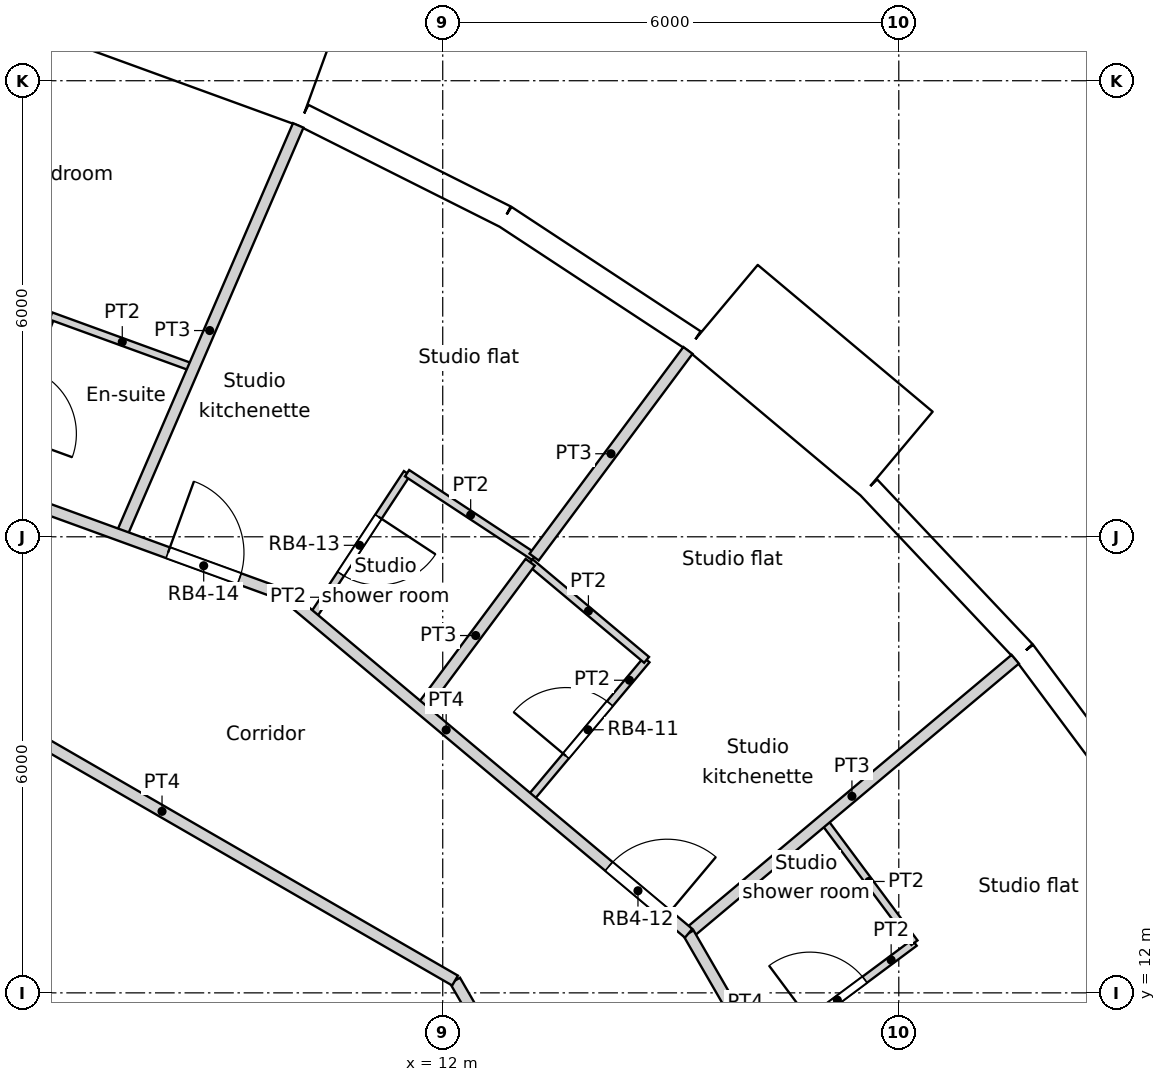
"""IFC4 building model, lengths in metres.
Left out: names, types, materials, properties, quantities, classifications, styles, units other than length and angle.
Written with IfcOpenShell. Run it as: python <this file> out.ifc"""

import sys

from ifc_helpers import new_model, si_unit, direction, frame, frame_2d, origin, origin_2d, place, context, subcontext, project, spatial, rectangle, circle, extrude, element, fill, save


model = new_model("IFC4")
c1 = context("Model", 3, precision=1e-05, world=origin(), true_north=direction((0.0, 1.0)))
c2 = subcontext(c1, "Body", "Model", "MODEL_VIEW")
j1 = project(units=[si_unit("LENGTHUNIT", "METRE"), si_unit("PLANEANGLEUNIT", "RADIAN")], contexts=[c1])
p1 = place(None, origin())
s1 = spatial("IfcSite", under=j1, at=p1, CompositionType="ELEMENT")
p2 = place(p1, origin())
s2 = spatial("IfcBuilding", under=s1, at=p2, CompositionType="ELEMENT")
p3 = place(p2, frame((0.0, 0.0, 158.4)))
s3 = spatial("IfcBuildingStorey", under=s2, at=p3, CompositionType="ELEMENT", Elevation=158.4)
for number, where, z_axis, x_axis in (
    (1, (18.805, 15.779, 0.0), (0.0, 0.0, 1.0), (1.0, 0.0, 0.0)),
    (2, (14.659, 19.69, 0.0), (0.0, 0.0, 1.0), (1.0, 0.0, 0.0)),
    (3, (9.723, 22.54, 0.0), (0.0, 0.0, 1.0), (1.0, 0.0, 0.0)),
):
    element("IfcColumn", number, at=place(p3, frame(where, z_axis=z_axis, x_axis=x_axis)), inside=s3, PredefinedType="COLUMN", context=c2, shape_type="SweptSolid", body=[
        extrude(circle(Radius=0.6, at=origin_2d()), origin(), (0.0, 0.0, 1.0), 3.6),
    ])
for number, where, z_axis, x_axis in (
    (4, (11.735, 14.716, 0.0), (0.0, 0.0, 1.0), (1.0, 0.0, 0.0)),
    (5, (6.876, 17.521, 0.0), (0.0, 0.0, 1.0), (1.0, 0.0, 0.0)),
):
    element("IfcColumn", number, at=place(p3, frame(where, z_axis=z_axis, x_axis=x_axis)), inside=s3, PredefinedType="COLUMN", context=c2, shape_type="SweptSolid", body=[
        extrude(circle(Radius=0.65, at=origin_2d()), origin(), (0.0, 0.0, 1.0), 3.6),
    ])
p4 = place(p3, frame((21.422, 14.101, 0.0), z_axis=(0.0, 0.0, 1.0), x_axis=(-0.597197580538, 0.80209416517, 0.0)))
e6 = element("IfcWall", 6, at=p4, inside=s3, PredefinedType="SOLIDWALL", context=c2, shape_type="SweptSolid", body=[
    extrude(rectangle(XDim=2.973, YDim=0.3, at=frame_2d((1.486, 0.0))), origin(), (0.0, 0.0, 1.0), 3.3),
])
p5 = place(p4, frame((1.486, 0.0, 1.55)))
e7 = element("IfcOpeningElement", 7, at=p5, cuts=e6, PredefinedType="OPENING", context=c2, shape_type="SweptSolid", body=[
    extrude(circle(Radius=0.9, at=origin_2d()), frame((0.0, 0.16, 0.0), z_axis=(0.0, -1.0, 0.0), x_axis=(1.0, 0.0, 0.0)), (0.0, 0.0, 1.0), 0.32),
])
p6 = place(p3, frame((19.647, 16.486, 0.0), z_axis=(0.0, 0.0, 1.0), x_axis=(-0.686235184166, 0.727379730273, 0.0)))
e8 = element("IfcWall", 8, at=p6, inside=s3, PredefinedType="SOLIDWALL", context=c2, shape_type="SweptSolid", body=[
    extrude(rectangle(XDim=2.973, YDim=0.3, at=frame_2d((1.486, 0.0))), origin(), (0.0, 0.0, 1.0), 3.3),
])
p7 = place(p6, frame((1.486, 0.0, 1.55)))
e9 = element("IfcOpeningElement", 9, at=p7, cuts=e8, PredefinedType="OPENING", context=c2, shape_type="SweptSolid", body=[
    extrude(circle(Radius=0.9, at=origin_2d()), frame((0.0, 0.16, 0.0), z_axis=(0.0, -1.0, 0.0), x_axis=(1.0, 0.0, 0.0)), (0.0, 0.0, 1.0), 0.32),
])
p8 = place(p3, frame((17.977, 19.09, -0.3), z_axis=(0.0, 0.0, 1.0), x_axis=(-0.766022196139, 0.642814121673, 0.0)))
e10 = element("IfcWall", 10, at=p8, inside=s3, PredefinedType="ELEMENTEDWALL", context=c2, shape_type="SweptSolid", body=[
    extrude(rectangle(XDim=3.0, YDim=1.45, at=frame_2d((1.5, 0.0))), origin(), (0.0, 0.0, 1.0), 3.6),
])
p9 = place(p8, frame((1.5, 0.0, 1.85)))
e11 = element("IfcOpeningElement", 11, at=p9, cuts=e10, PredefinedType="OPENING", context=c2, shape_type="SweptSolid", body=[
    extrude(circle(Radius=0.9, at=origin_2d()), frame((0.0, 0.735, 0.0), z_axis=(0.0, -1.0, 0.0), x_axis=(1.0, 0.0, 0.0)), (0.0, 0.0, 1.0), 1.47),
])
p10 = place(p3, frame((15.308, 20.578, 0.0), z_axis=(0.0, 0.0, 1.0), x_axis=(-0.835470659512, 0.549535055382, 0.0)))
e12 = element("IfcWall", 12, at=p10, inside=s3, PredefinedType="SOLIDWALL", context=c2, shape_type="SweptSolid", body=[
    extrude(rectangle(XDim=2.973, YDim=0.3, at=frame_2d((1.487, 0.0))), origin(), (0.0, 0.0, 1.0), 3.3),
])
p11 = place(p10, frame((1.486, 0.0, 1.55)))
e13 = element("IfcOpeningElement", 13, at=p11, cuts=e12, PredefinedType="OPENING", context=c2, shape_type="SweptSolid", body=[
    extrude(circle(Radius=0.9, at=origin_2d()), frame((0.0, 0.16, 0.0), z_axis=(0.0, -1.0, 0.0), x_axis=(1.0, 0.0, 0.0)), (0.0, 0.0, 1.0), 0.32),
])
p12 = place(p3, frame((12.824, 22.211, 0.0), z_axis=(0.0, 0.0, 1.0), x_axis=(-0.893637442555, 0.448789618045, 0.0)))
e14 = element("IfcWall", 14, at=p12, inside=s3, PredefinedType="SOLIDWALL", context=c2, shape_type="SweptSolid", body=[
    extrude(rectangle(XDim=2.973, YDim=0.3, at=frame_2d((1.486, 0.0))), origin(), (0.0, 0.0, 1.0), 3.3),
])
p13 = place(p12, frame((1.486, 0.0, 1.55)))
e15 = element("IfcOpeningElement", 15, at=p13, cuts=e14, PredefinedType="OPENING", context=c2, shape_type="SweptSolid", body=[
    extrude(circle(Radius=0.9, at=origin_2d()), frame((0.0, 0.16, 0.0), z_axis=(0.0, -1.0, 0.0), x_axis=(1.0, 0.0, 0.0)), (0.0, 0.0, 1.0), 0.32),
])
p14 = place(p3, frame((10.363, 24.087, -0.3), z_axis=(0.0, 0.0, 1.0), x_axis=(-0.939686455819, 0.342037080957, 0.0)))
e16 = element("IfcWall", 16, at=p14, inside=s3, PredefinedType="ELEMENTEDWALL", context=c2, shape_type="SweptSolid", body=[
    extrude(rectangle(XDim=3.0, YDim=1.45, at=frame_2d((1.5, 0.0))), origin(), (0.0, 0.0, 1.0), 3.6),
])
p15 = place(p14, frame((1.5, 0.0, 1.85)))
e17 = element("IfcOpeningElement", 17, at=p15, cuts=e16, PredefinedType="OPENING", context=c2, shape_type="SweptSolid", body=[
    extrude(circle(Radius=0.9, at=origin_2d()), frame((0.0, 0.735, 0.0), z_axis=(0.0, -1.0, 0.0), x_axis=(1.0, 0.0, 0.0)), (0.0, 0.0, 1.0), 1.47),
])
p16 = place(p3, frame((12.162, 12.162, 0.0), z_axis=(0.0, 0.0, 1.0), x_axis=(0.499961633463, -0.866047553582, 0.0)))
e18 = element("IfcWall", 18, at=p16, inside=s3, PredefinedType="PARTITIONING", context=c2, shape_type="SweptSolid", body=[
    extrude(rectangle(XDim=2.15, YDim=0.15, at=frame_2d((1.075, 0.0))), origin(), (0.0, 0.0, 1.0), 3.3),
])
p17 = place(p3, frame((15.235, 12.784, 0.0), z_axis=(0.0, 0.0, 1.0), x_axis=(0.499940714931, -0.86605962933, 0.0)))
e19 = element("IfcWall", 19, at=p17, inside=s3, PredefinedType="PARTITIONING", context=c2, shape_type="SweptSolid", body=[
    extrude(rectangle(XDim=6.907, YDim=0.15, at=frame_2d((3.454, 0.0))), origin(), (0.0, 0.0, 1.0), 3.3),
])
p18 = place(p17, frame((5.249, 0.0, 0.0)))
e20 = element("IfcOpeningElement", 20, at=p18, cuts=e19, PredefinedType="OPENING", context=c2, shape_type="SweptSolid", body=[
    extrude(rectangle(XDim=1.0, YDim=2.1, at=frame_2d((0.5, 1.05))), frame((0.0, 0.075, 0.0), z_axis=(0.0, -1.0, 0.0), x_axis=(1.0, 0.0, 0.0)), (0.0, 0.0, 1.0), 0.15),
])
p19 = place(p17, frame((3.041, 0.0, 0.0)))
e21 = element("IfcOpeningElement", 21, at=p19, cuts=e19, PredefinedType="OPENING", context=c2, shape_type="SweptSolid", body=[
    extrude(rectangle(XDim=1.0, YDim=2.1, at=frame_2d((0.5, 1.05))), frame((0.0, 0.075, 0.0), z_axis=(0.0, -1.0, 0.0), x_axis=(1.0, 0.0, 0.0)), (0.0, 0.0, 1.0), 0.15),
])
p20 = place(p3, frame((9.943, 17.222, 0.0), z_axis=(0.0, 0.0, 1.0), x_axis=(0.766192104565, -0.642611592567, 0.0)))
e22 = element("IfcWall", 22, at=p20, inside=s3, PredefinedType="PARTITIONING", context=c2, shape_type="SweptSolid", body=[
    extrude(rectangle(XDim=6.906, YDim=0.15, at=frame_2d((3.453, 0.0))), origin(), (0.0, 0.0, 1.0), 3.3),
])
p21 = place(p20, frame((5.537, 0.0, 0.0)))
e23 = element("IfcOpeningElement", 23, at=p21, cuts=e22, PredefinedType="OPENING", context=c2, shape_type="SweptSolid", body=[
    extrude(rectangle(XDim=1.0, YDim=2.1, at=frame_2d((0.5, 1.05))), frame((0.0, 0.075, 0.0), z_axis=(0.0, -1.0, 0.0), x_axis=(1.0, 0.0, 0.0)), (0.0, 0.0, 1.0), 0.15),
])
p22 = place(p3, frame((4.452, 16.614, 0.0), z_axis=(0.0, 0.0, 1.0), x_axis=(0.866005203721, -0.500034985904, 0.0)))
e24 = element("IfcWall", 24, at=p22, inside=s3, PredefinedType="PARTITIONING", context=c2, shape_type="SweptSolid", body=[
    extrude(rectangle(XDim=8.903, YDim=0.15, at=frame_2d((4.452, 0.0))), origin(), (0.0, 0.0, 1.0), 3.3),
])
p23 = place(p3, frame((3.452, 19.585, 0.0), z_axis=(0.0, 0.0, 1.0), x_axis=(0.939737689664, -0.341896292208, 0.0)))
e25 = element("IfcWall", 25, at=p23, inside=s3, PredefinedType="PARTITIONING", context=c2, shape_type="SweptSolid", body=[
    extrude(rectangle(XDim=6.908, YDim=0.15, at=frame_2d((3.454, 0.0))), origin(), (0.0, 0.0, 1.0), 3.3),
])
p24 = place(p23, frame((5.249, 0.0, 0.0)))
e26 = element("IfcOpeningElement", 26, at=p24, cuts=e25, PredefinedType="OPENING", context=c2, shape_type="SweptSolid", body=[
    extrude(rectangle(XDim=1.0, YDim=2.1, at=frame_2d((0.5, 1.05))), frame((0.0, 0.075, 0.0), z_axis=(0.0, -1.0, 0.0), x_axis=(1.0, 0.0, 0.0)), (0.0, 0.0, 1.0), 0.15),
])
p25 = place(p3, frame((16.178, 11.15, 0.0), z_axis=(0.0, 0.0, 1.0), x_axis=(0.8020923136, 0.597200067367, 0.0)))
e27 = element("IfcWall", 27, at=p25, inside=s3, PredefinedType="PARTITIONING", context=c2, shape_type="SweptSolid", body=[
    extrude(rectangle(XDim=2.529, YDim=0.1, at=frame_2d((1.264, 0.0))), origin(), (0.0, 0.0, 1.0), 3.3),
])
p26 = place(p25, frame((0.814, 0.0, 0.0)))
e28 = element("IfcOpeningElement", 28, at=p26, cuts=e27, PredefinedType="OPENING", context=c2, shape_type="SweptSolid", body=[
    extrude(rectangle(XDim=0.9, YDim=2.04, at=frame_2d((0.45, 1.02))), frame((0.0, 0.05, 0.0), z_axis=(0.0, -1.0, 0.0), x_axis=(1.0, 0.0, 0.0)), (0.0, 0.0, 1.0), 0.1),
])
p27 = place(p3, frame((17.007, 14.271, 0.0), z_axis=(0.0, 0.0, 1.0), x_axis=(0.597019866774, -0.802226450996, 0.0)))
e29 = element("IfcWall", 29, at=p27, inside=s3, PredefinedType="PARTITIONING", context=c2, shape_type="SweptSolid", body=[
    extrude(rectangle(XDim=2.008, YDim=0.1, at=frame_2d((1.004, 0.0))), origin(), (0.0, 0.0, 1.0), 3.3),
])
p28 = place(p3, frame((15.235, 12.784, 0.0), z_axis=(0.0, 0.0, 1.0), x_axis=(0.766069165353, 0.642758145725, 0.0)))
e30 = element("IfcWall", 30, at=p28, inside=s3, PredefinedType="PARTITIONING", context=c2, shape_type="SweptSolid", body=[
    extrude(rectangle(XDim=5.609, YDim=0.15, at=frame_2d((2.804, 0.0))), origin(), (0.0, 0.0, 1.0), 3.3),
])
p29 = place(p3, frame((13.139, 14.542, 0.0), z_axis=(0.0, 0.0, 1.0), x_axis=(0.642731657745, 0.766091388891, 0.0)))
e31 = element("IfcWall", 31, at=p29, inside=s3, PredefinedType="PARTITIONING", context=c2, shape_type="SweptSolid", body=[
    extrude(rectangle(XDim=2.401, YDim=0.1, at=frame_2d((1.2, 0.0))), origin(), (0.0, 0.0, 1.0), 3.3),
])
p30 = place(p29, frame((0.75, 0.0, 0.0)))
e32 = element("IfcOpeningElement", 32, at=p30, cuts=e31, PredefinedType="OPENING", context=c2, shape_type="SweptSolid", body=[
    extrude(rectangle(XDim=0.9, YDim=2.04, at=frame_2d((0.45, 1.02))), frame((0.0, 0.05, 0.0), z_axis=(0.0, -1.0, 0.0), x_axis=(1.0, 0.0, 0.0)), (0.0, 0.0, 1.0), 0.1),
])
p31 = place(p3, frame((13.151, 17.665, 0.0), z_axis=(0.0, 0.0, 1.0), x_axis=(0.766224532916, -0.642572925945, 0.0)))
e33 = element("IfcWall", 33, at=p31, inside=s3, PredefinedType="PARTITIONING", context=c2, shape_type="SweptSolid", body=[
    extrude(rectangle(XDim=1.998, YDim=0.1, at=frame_2d((0.999, 0.0))), origin(), (0.0, 0.0, 1.0), 3.3),
])
p32 = place(p3, frame((13.202, 17.733, 0.0), z_axis=(0.0, 0.0, 1.0), x_axis=(0.597149819296, 0.802129723495, 0.0)))
e34 = element("IfcWall", 34, at=p32, inside=s3, PredefinedType="PARTITIONING", context=c2, shape_type="SweptSolid", body=[
    extrude(rectangle(XDim=3.39, YDim=0.15, at=frame_2d((1.695, 0.0))), origin(), (0.0, 0.0, 1.0), 3.3),
])
p33 = place(p3, frame((11.716, 15.737, 0.0), z_axis=(0.0, 0.0, 1.0), x_axis=(0.597021412293, 0.802225300813, 0.0)))
e35 = element("IfcWall", 35, at=p33, inside=s3, PredefinedType="PARTITIONING", context=c2, shape_type="SweptSolid", body=[
    extrude(rectangle(XDim=2.403, YDim=0.15, at=frame_2d((1.202, 0.0))), origin(), (0.0, 0.0, 1.0), 3.3),
])
p34 = place(p3, frame((11.531, 18.837, 0.0), z_axis=(0.0, 0.0, 1.0), x_axis=(0.835392041163, -0.549654562032, 0.0)))
e36 = element("IfcWall", 36, at=p34, inside=s3, PredefinedType="PARTITIONING", context=c2, shape_type="SweptSolid", body=[
    extrude(rectangle(XDim=2.003, YDim=0.1, at=frame_2d((1.001, 0.0))), origin(), (0.0, 0.0, 1.0), 3.3),
])
p35 = place(p3, frame((10.282, 16.939, 0.0), z_axis=(0.0, 0.0, 1.0), x_axis=(0.549730960803, 0.83534176882, 0.0)))
e37 = element("IfcWall", 37, at=p35, inside=s3, PredefinedType="PARTITIONING", context=c2, shape_type="SweptSolid", body=[
    extrude(rectangle(XDim=2.272, YDim=0.1, at=frame_2d((1.136, 0.0))), origin(), (0.0, 0.0, 1.0), 3.3),
])
p36 = place(p35, frame((0.686, 0.0, 0.0)))
e38 = element("IfcOpeningElement", 38, at=p36, cuts=e37, PredefinedType="OPENING", context=c2, shape_type="SweptSolid", body=[
    extrude(rectangle(XDim=0.9, YDim=2.04, at=frame_2d((0.45, 1.02))), frame((0.0, 0.05, 0.0), z_axis=(0.0, -1.0, 0.0), x_axis=(1.0, 0.0, 0.0)), (0.0, 0.0, 1.0), 0.1),
])
p37 = place(p3, frame((7.77, 18.015, 0.0), z_axis=(0.0, 0.0, 1.0), x_axis=(0.396238716554, 0.918147526002, 0.0)))
e39 = element("IfcWall", 39, at=p37, inside=s3, PredefinedType="PARTITIONING", context=c2, shape_type="SweptSolid", body=[
    extrude(rectangle(XDim=5.879, YDim=0.15, at=frame_2d((2.939, 0.0))), origin(), (0.0, 0.0, 1.0), 3.3),
])
p38 = place(p3, frame((6.845, 20.905, 0.0), z_axis=(0.0, 0.0, 1.0), x_axis=(0.939757747305, -0.341841156651, 0.0)))
e40 = element("IfcWall", 40, at=p38, inside=s3, PredefinedType="PARTITIONING", context=c2, shape_type="SweptSolid", body=[
    extrude(rectangle(XDim=1.998, YDim=0.1, at=frame_2d((0.999, 0.0))), origin(), (0.0, 0.0, 1.0), 3.3),
])
p39 = place(p3, frame((6.024, 18.65, 0.0), z_axis=(0.0, 0.0, 1.0), x_axis=(0.342110593602, 0.939659694648, 0.0)))
e41 = element("IfcWall", 41, at=p39, inside=s3, PredefinedType="PARTITIONING", context=c2, shape_type="SweptSolid", body=[
    extrude(rectangle(XDim=2.4, YDim=0.1, at=frame_2d((1.2, 0.0))), origin(), (0.0, 0.0, 1.0), 3.3),
])
p40 = place(p39, frame((0.75, 0.0, 0.0)))
e42 = element("IfcOpeningElement", 42, at=p40, cuts=e41, PredefinedType="OPENING", context=c2, shape_type="SweptSolid", body=[
    extrude(rectangle(XDim=0.9, YDim=2.04, at=frame_2d((0.45, 1.02))), frame((0.0, 0.05, 0.0), z_axis=(0.0, -1.0, 0.0), x_axis=(1.0, 0.0, 0.0)), (0.0, 0.0, 1.0), 0.1),
])
p41 = place(p5, origin())
e43 = element("IfcWindow", 43, at=p41, inside=s3, PartitioningType="SINGLE_PANEL", PredefinedType="WINDOW", context=c2, shape_type="SweptSolid", body=[
    extrude(circle(Radius=0.9, at=origin_2d()), frame((0.0, 0.12, 0.0), z_axis=(0.0, -1.0, 0.0), x_axis=(1.0, 0.0, 0.0)), (0.0, 0.0, 1.0), 0.1),
])
fill(e7, e43)
p42 = place(p7, origin())
e44 = element("IfcWindow", 44, at=p42, inside=s3, PartitioningType="SINGLE_PANEL", PredefinedType="WINDOW", context=c2, shape_type="SweptSolid", body=[
    extrude(circle(Radius=0.9, at=origin_2d()), frame((0.0, 0.12, 0.0), z_axis=(0.0, -1.0, 0.0), x_axis=(1.0, 0.0, 0.0)), (0.0, 0.0, 1.0), 0.1),
])
fill(e9, e44)
p43 = place(p9, origin())
e45 = element("IfcWindow", 45, at=p43, inside=s3, PartitioningType="SINGLE_PANEL", PredefinedType="WINDOW", context=c2, shape_type="SweptSolid", body=[
    extrude(circle(Radius=0.9, at=origin_2d()), frame((0.0, 0.695, 0.0), z_axis=(0.0, -1.0, 0.0), x_axis=(1.0, 0.0, 0.0)), (0.0, 0.0, 1.0), 0.1),
])
fill(e11, e45)
p44 = place(p11, origin())
e46 = element("IfcWindow", 46, at=p44, inside=s3, PartitioningType="SINGLE_PANEL", PredefinedType="WINDOW", context=c2, shape_type="SweptSolid", body=[
    extrude(circle(Radius=0.9, at=origin_2d()), frame((0.0, 0.12, 0.0), z_axis=(0.0, -1.0, 0.0), x_axis=(1.0, 0.0, 0.0)), (0.0, 0.0, 1.0), 0.1),
])
fill(e13, e46)
p45 = place(p13, origin())
e47 = element("IfcWindow", 47, at=p45, inside=s3, PartitioningType="SINGLE_PANEL", PredefinedType="WINDOW", context=c2, shape_type="SweptSolid", body=[
    extrude(circle(Radius=0.9, at=origin_2d()), frame((0.0, 0.12, 0.0), z_axis=(0.0, -1.0, 0.0), x_axis=(1.0, 0.0, 0.0)), (0.0, 0.0, 1.0), 0.1),
])
fill(e15, e47)
p46 = place(p15, origin())
e48 = element("IfcWindow", 48, at=p46, inside=s3, PartitioningType="SINGLE_PANEL", PredefinedType="WINDOW", context=c2, shape_type="SweptSolid", body=[
    extrude(circle(Radius=0.9, at=origin_2d()), frame((0.0, 0.695, 0.0), z_axis=(0.0, -1.0, 0.0), x_axis=(1.0, 0.0, 0.0)), (0.0, 0.0, 1.0), 0.1),
])
fill(e17, e48)
p47 = place(p26, origin())
e49 = element("IfcDoor", 49, at=p47, inside=s3, OperationType="SINGLE_SWING_LEFT", PredefinedType="DOOR", context=c2, shape_type="SweptSolid", body=[
    extrude(rectangle(XDim=0.9, YDim=2.04, at=frame_2d((0.45, 1.02))), frame((0.0, 0.025, 0.0), z_axis=(0.0, -1.0, 0.0), x_axis=(1.0, 0.0, 0.0)), (0.0, 0.0, 1.0), 0.05),
])
fill(e28, e49)
p48 = place(p30, origin())
e50 = element("IfcDoor", 50, at=p48, inside=s3, OperationType="SINGLE_SWING_LEFT", PredefinedType="DOOR", context=c2, shape_type="SweptSolid", body=[
    extrude(rectangle(XDim=0.9, YDim=2.04, at=frame_2d((0.45, 1.02))), frame((0.0, 0.025, 0.0), z_axis=(0.0, -1.0, 0.0), x_axis=(1.0, 0.0, 0.0)), (0.0, 0.0, 1.0), 0.05),
])
fill(e32, e50)
p49 = place(p21, origin())
e51 = element("IfcDoor", 51, at=p49, inside=s3, OperationType="SINGLE_SWING_RIGHT", PredefinedType="DOOR", context=c2, shape_type="SweptSolid", body=[
    extrude(rectangle(XDim=1.0, YDim=2.1, at=frame_2d((0.5, 1.05))), frame((0.0, 0.025, 0.0), z_axis=(0.0, -1.0, 0.0), x_axis=(1.0, 0.0, 0.0)), (0.0, 0.0, 1.0), 0.05),
])
fill(e23, e51)
p50 = place(p36, origin())
e52 = element("IfcDoor", 52, at=p50, inside=s3, OperationType="SINGLE_SWING_LEFT", PredefinedType="DOOR", context=c2, shape_type="SweptSolid", body=[
    extrude(rectangle(XDim=0.9, YDim=2.04, at=frame_2d((0.45, 1.02))), frame((0.0, 0.025, 0.0), z_axis=(0.0, -1.0, 0.0), x_axis=(1.0, 0.0, 0.0)), (0.0, 0.0, 1.0), 0.05),
])
fill(e38, e52)
p51 = place(p24, origin())
e53 = element("IfcDoor", 53, at=p51, inside=s3, OperationType="SINGLE_SWING_LEFT", PredefinedType="DOOR", context=c2, shape_type="SweptSolid", body=[
    extrude(rectangle(XDim=1.0, YDim=2.1, at=frame_2d((0.5, 1.05))), frame((0.0, 0.025, 0.0), z_axis=(0.0, -1.0, 0.0), x_axis=(1.0, 0.0, 0.0)), (0.0, 0.0, 1.0), 0.05),
])
fill(e26, e53)
save(model, sys.argv[1])
